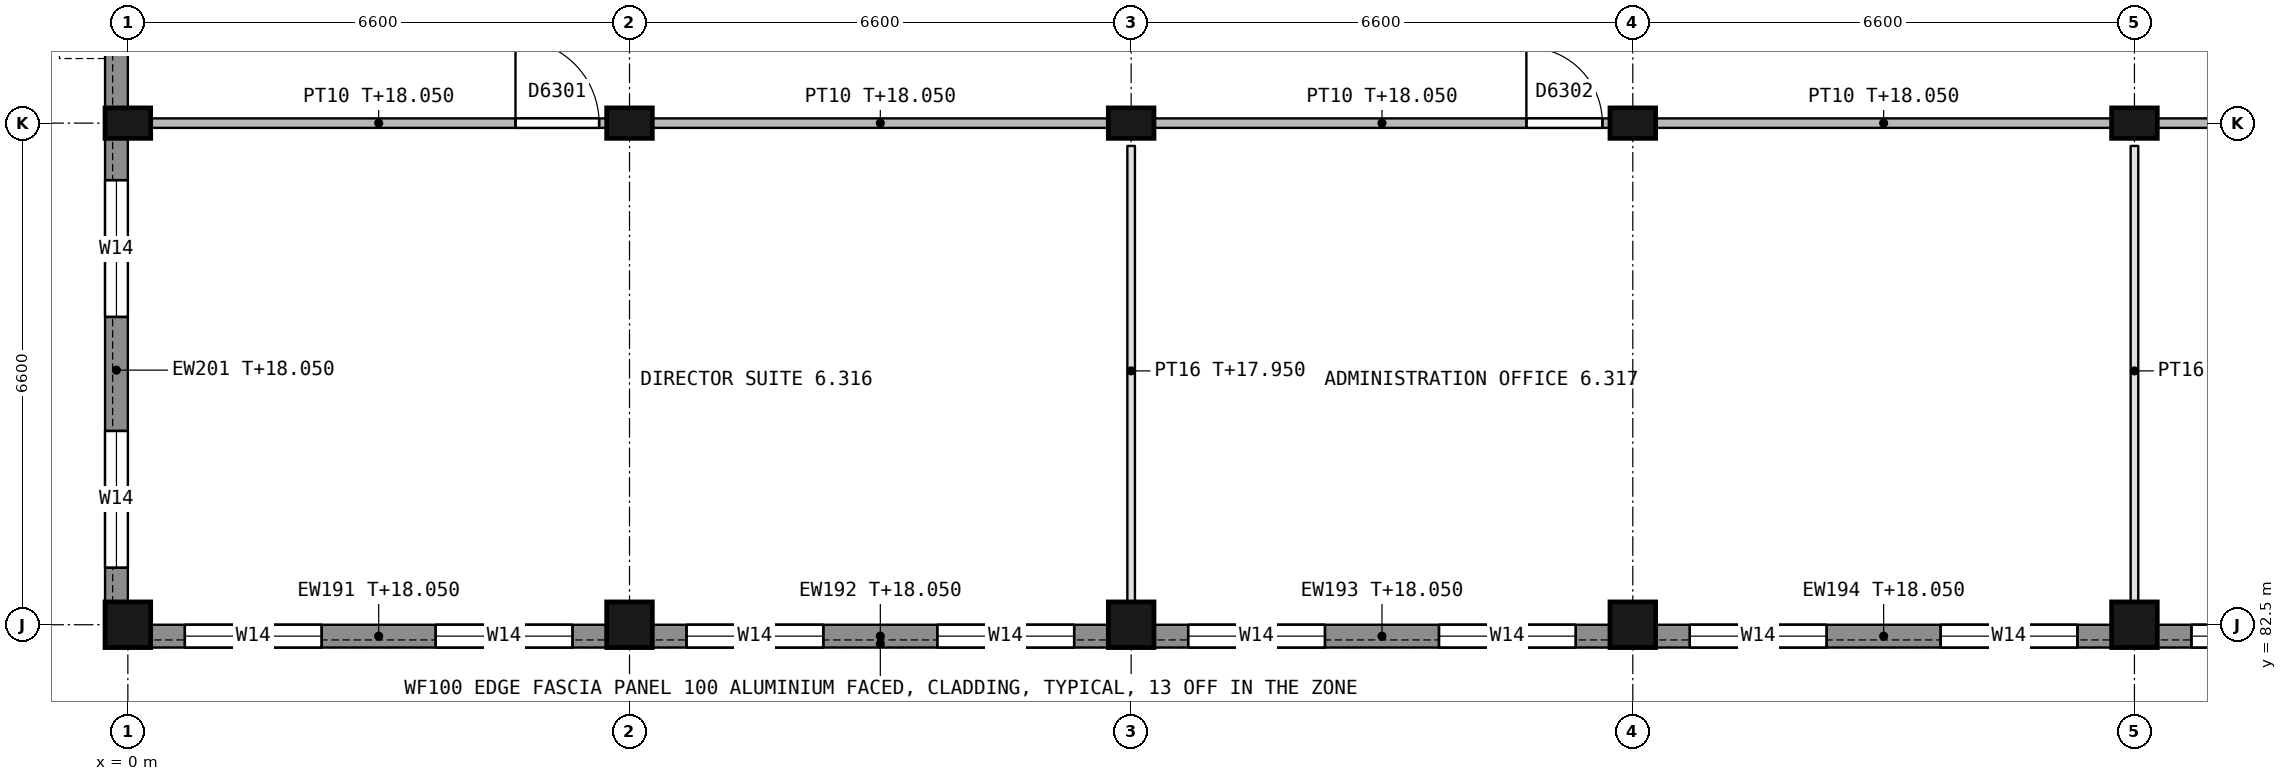
"""IFC4 building model, lengths in metres.
Left out: names, types, materials, properties, quantities, classifications, styles, units other than length and angle.
Written with IfcOpenShell. Run it as: python <this file> out.ifc"""

import sys

from ifc_helpers import new_model, si_unit, direction, frame, frame_2d, origin, origin_2d, place, context, subcontext, project, spatial, rectangle, extrude, element, fill, save


model = new_model("IFC4")
c1 = context("Model", 3, precision=1e-05, world=origin(), true_north=direction((0.0, 1.0)))
c2 = subcontext(c1, "Body", "Model", "MODEL_VIEW")
j1 = project(units=[si_unit("LENGTHUNIT", "METRE"), si_unit("PLANEANGLEUNIT", "RADIAN")], contexts=[c1])
p1 = place(None, origin())
s1 = spatial("IfcSite", under=j1, at=p1, CompositionType="ELEMENT")
p2 = place(p1, origin())
s2 = spatial("IfcBuilding", under=s1, at=p2, CompositionType="ELEMENT")
p3 = place(p2, frame((0.0, 0.0, 14.4)))
s3 = spatial("IfcBuildingStorey", under=s2, at=p3, CompositionType="ELEMENT", Elevation=14.4)
p4 = place(p3, frame((0.0, 82.5, 0.0), z_axis=(0.0, 0.0, 1.0), x_axis=(1.0, 0.0, 0.0)))
e1 = element("IfcColumn", 1, at=p4, inside=s3, PredefinedType="COLUMN", context=c2, shape_type="SweptSolid", body=[
    extrude(rectangle(XDim=0.6, YDim=0.6, at=origin_2d()), origin(), (0.0, 0.0, 1.0), 4.5),
])
p5 = place(p3, frame((0.0, 89.1, 0.0), z_axis=(0.0, 0.0, 1.0), x_axis=(1.0, 0.0, 0.0)))
e2 = element("IfcColumn", 2, at=p5, inside=s3, PredefinedType="COLUMN", context=c2, shape_type="SweptSolid", body=[
    extrude(rectangle(XDim=0.6, YDim=0.4, at=origin_2d()), origin(), (0.0, 0.0, 1.0), 4.5),
])
p6 = place(p3, frame((6.6, 82.5, 0.0), z_axis=(0.0, 0.0, 1.0), x_axis=(1.0, 0.0, 0.0)))
e3 = element("IfcColumn", 3, at=p6, inside=s3, PredefinedType="COLUMN", context=c2, shape_type="SweptSolid", body=[
    extrude(rectangle(XDim=0.6, YDim=0.6, at=origin_2d()), origin(), (0.0, 0.0, 1.0), 4.5),
])
p7 = place(p3, frame((6.6, 89.1, 0.0), z_axis=(0.0, 0.0, 1.0), x_axis=(1.0, 0.0, 0.0)))
e4 = element("IfcColumn", 4, at=p7, inside=s3, PredefinedType="COLUMN", context=c2, shape_type="SweptSolid", body=[
    extrude(rectangle(XDim=0.6, YDim=0.4, at=origin_2d()), origin(), (0.0, 0.0, 1.0), 4.5),
])
p8 = place(p3, frame((13.2, 82.5, 0.0), z_axis=(0.0, 0.0, 1.0), x_axis=(1.0, 0.0, 0.0)))
e5 = element("IfcColumn", 5, at=p8, inside=s3, PredefinedType="COLUMN", context=c2, shape_type="SweptSolid", body=[
    extrude(rectangle(XDim=0.6, YDim=0.6, at=origin_2d()), origin(), (0.0, 0.0, 1.0), 4.5),
])
p9 = place(p3, frame((13.2, 89.1, 0.0), z_axis=(0.0, 0.0, 1.0), x_axis=(1.0, 0.0, 0.0)))
e6 = element("IfcColumn", 6, at=p9, inside=s3, PredefinedType="COLUMN", context=c2, shape_type="SweptSolid", body=[
    extrude(rectangle(XDim=0.6, YDim=0.4, at=origin_2d()), origin(), (0.0, 0.0, 1.0), 4.5),
])
p10 = place(p3, frame((19.8, 82.5, 0.0), z_axis=(0.0, 0.0, 1.0), x_axis=(1.0, 0.0, 0.0)))
e7 = element("IfcColumn", 7, at=p10, inside=s3, PredefinedType="COLUMN", context=c2, shape_type="SweptSolid", body=[
    extrude(rectangle(XDim=0.6, YDim=0.6, at=origin_2d()), origin(), (0.0, 0.0, 1.0), 4.5),
])
p11 = place(p3, frame((19.8, 89.1, 0.0), z_axis=(0.0, 0.0, 1.0), x_axis=(1.0, 0.0, 0.0)))
e8 = element("IfcColumn", 8, at=p11, inside=s3, PredefinedType="COLUMN", context=c2, shape_type="SweptSolid", body=[
    extrude(rectangle(XDim=0.6, YDim=0.4, at=origin_2d()), origin(), (0.0, 0.0, 1.0), 4.5),
])
p12 = place(p3, frame((26.4, 82.5, 0.0), z_axis=(0.0, 0.0, 1.0), x_axis=(1.0, 0.0, 0.0)))
e9 = element("IfcColumn", 9, at=p12, inside=s3, PredefinedType="COLUMN", context=c2, shape_type="SweptSolid", body=[
    extrude(rectangle(XDim=0.6, YDim=0.6, at=origin_2d()), origin(), (0.0, 0.0, 1.0), 4.5),
])
p13 = place(p3, frame((26.4, 89.1, 0.0), z_axis=(0.0, 0.0, 1.0), x_axis=(1.0, 0.0, 0.0)))
e10 = element("IfcColumn", 10, at=p13, inside=s3, PredefinedType="COLUMN", context=c2, shape_type="SweptSolid", body=[
    extrude(rectangle(XDim=0.6, YDim=0.4, at=origin_2d()), origin(), (0.0, 0.0, 1.0), 4.5),
])
p14 = place(p3, frame((6.3, 82.35, 0.0), z_axis=(0.0, 0.0, 1.0), x_axis=(-1.0, 0.0, 0.0)))
e11 = element("IfcWall", 11, at=p14, inside=s3, PredefinedType="STANDARD", context=c2, shape_type="SweptSolid", body=[
    extrude(rectangle(XDim=6.0, YDim=0.3, at=frame_2d((3.0, 0.0))), origin(), (0.0, 0.0, 1.0), 3.65),
])
p15 = place(p14, frame((3.75, 0.0, 0.9)))
e12 = element("IfcOpeningElement", 12, at=p15, cuts=e11, PredefinedType="OPENING", context=c2, shape_type="SweptSolid", body=[
    extrude(rectangle(XDim=1.8, YDim=1.5, at=frame_2d((0.9, 0.75))), frame((0.0, 0.16, 0.0), z_axis=(0.0, -1.0, 0.0), x_axis=(1.0, 0.0, 0.0)), (0.0, 0.0, 1.0), 0.32),
])
p16 = place(p14, frame((0.45, 0.0, 0.9)))
e13 = element("IfcOpeningElement", 13, at=p16, cuts=e11, PredefinedType="OPENING", context=c2, shape_type="SweptSolid", body=[
    extrude(rectangle(XDim=1.8, YDim=1.5, at=frame_2d((0.9, 0.75))), frame((0.0, 0.16, 0.0), z_axis=(0.0, -1.0, 0.0), x_axis=(1.0, 0.0, 0.0)), (0.0, 0.0, 1.0), 0.32),
])
p17 = place(p3, frame((12.9, 82.35, 0.0), z_axis=(0.0, 0.0, 1.0), x_axis=(-1.0, 0.0, 0.0)))
e14 = element("IfcWall", 14, at=p17, inside=s3, PredefinedType="STANDARD", context=c2, shape_type="SweptSolid", body=[
    extrude(rectangle(XDim=6.0, YDim=0.3, at=frame_2d((3.0, 0.0))), origin(), (0.0, 0.0, 1.0), 3.65),
])
p18 = place(p17, frame((3.75, 0.0, 0.9)))
e15 = element("IfcOpeningElement", 15, at=p18, cuts=e14, PredefinedType="OPENING", context=c2, shape_type="SweptSolid", body=[
    extrude(rectangle(XDim=1.8, YDim=1.5, at=frame_2d((0.9, 0.75))), frame((0.0, 0.16, 0.0), z_axis=(0.0, -1.0, 0.0), x_axis=(1.0, 0.0, 0.0)), (0.0, 0.0, 1.0), 0.32),
])
p19 = place(p17, frame((0.45, 0.0, 0.9)))
e16 = element("IfcOpeningElement", 16, at=p19, cuts=e14, PredefinedType="OPENING", context=c2, shape_type="SweptSolid", body=[
    extrude(rectangle(XDim=1.8, YDim=1.5, at=frame_2d((0.9, 0.75))), frame((0.0, 0.16, 0.0), z_axis=(0.0, -1.0, 0.0), x_axis=(1.0, 0.0, 0.0)), (0.0, 0.0, 1.0), 0.32),
])
p20 = place(p3, frame((19.5, 82.35, 0.0), z_axis=(0.0, 0.0, 1.0), x_axis=(-1.0, 0.0, 0.0)))
e17 = element("IfcWall", 17, at=p20, inside=s3, PredefinedType="STANDARD", context=c2, shape_type="SweptSolid", body=[
    extrude(rectangle(XDim=6.0, YDim=0.3, at=frame_2d((3.0, 0.0))), origin(), (0.0, 0.0, 1.0), 3.65),
])
p21 = place(p20, frame((3.75, 0.0, 0.9)))
e18 = element("IfcOpeningElement", 18, at=p21, cuts=e17, PredefinedType="OPENING", context=c2, shape_type="SweptSolid", body=[
    extrude(rectangle(XDim=1.8, YDim=1.5, at=frame_2d((0.9, 0.75))), frame((0.0, 0.16, 0.0), z_axis=(0.0, -1.0, 0.0), x_axis=(1.0, 0.0, 0.0)), (0.0, 0.0, 1.0), 0.32),
])
p22 = place(p20, frame((0.45, 0.0, 0.9)))
e19 = element("IfcOpeningElement", 19, at=p22, cuts=e17, PredefinedType="OPENING", context=c2, shape_type="SweptSolid", body=[
    extrude(rectangle(XDim=1.8, YDim=1.5, at=frame_2d((0.9, 0.75))), frame((0.0, 0.16, 0.0), z_axis=(0.0, -1.0, 0.0), x_axis=(1.0, 0.0, 0.0)), (0.0, 0.0, 1.0), 0.32),
])
p23 = place(p3, frame((26.1, 82.35, 0.0), z_axis=(0.0, 0.0, 1.0), x_axis=(-1.0, 0.0, 0.0)))
e20 = element("IfcWall", 20, at=p23, inside=s3, PredefinedType="STANDARD", context=c2, shape_type="SweptSolid", body=[
    extrude(rectangle(XDim=6.0, YDim=0.3, at=frame_2d((3.0, 0.0))), origin(), (0.0, 0.0, 1.0), 3.65),
])
p24 = place(p23, frame((3.75, 0.0, 0.9)))
e21 = element("IfcOpeningElement", 21, at=p24, cuts=e20, PredefinedType="OPENING", context=c2, shape_type="SweptSolid", body=[
    extrude(rectangle(XDim=1.8, YDim=1.5, at=frame_2d((0.9, 0.75))), frame((0.0, 0.16, 0.0), z_axis=(0.0, -1.0, 0.0), x_axis=(1.0, 0.0, 0.0)), (0.0, 0.0, 1.0), 0.32),
])
p25 = place(p23, frame((0.45, 0.0, 0.9)))
e22 = element("IfcOpeningElement", 22, at=p25, cuts=e20, PredefinedType="OPENING", context=c2, shape_type="SweptSolid", body=[
    extrude(rectangle(XDim=1.8, YDim=1.5, at=frame_2d((0.9, 0.75))), frame((0.0, 0.16, 0.0), z_axis=(0.0, -1.0, 0.0), x_axis=(1.0, 0.0, 0.0)), (0.0, 0.0, 1.0), 0.32),
])
p26 = place(p3, frame((32.7, 82.35, 0.0), z_axis=(0.0, 0.0, 1.0), x_axis=(-1.0, 0.0, 0.0)))
e23 = element("IfcWall", 23, at=p26, inside=s3, PredefinedType="STANDARD", context=c2, shape_type="SweptSolid", body=[
    extrude(rectangle(XDim=6.0, YDim=0.3, at=frame_2d((3.0, 0.0))), origin(), (0.0, 0.0, 1.0), 3.65),
])
p27 = place(p26, frame((3.75, 0.0, 0.9)))
e24 = element("IfcOpeningElement", 24, at=p27, cuts=e23, PredefinedType="OPENING", context=c2, shape_type="SweptSolid", body=[
    extrude(rectangle(XDim=1.8, YDim=1.5, at=frame_2d((0.9, 0.75))), frame((0.0, 0.16, 0.0), z_axis=(0.0, -1.0, 0.0), x_axis=(1.0, 0.0, 0.0)), (0.0, 0.0, 1.0), 0.32),
])
p28 = place(p26, frame((0.45, 0.0, 0.9)))
e25 = element("IfcOpeningElement", 25, at=p28, cuts=e23, PredefinedType="OPENING", context=c2, shape_type="SweptSolid", body=[
    extrude(rectangle(XDim=1.8, YDim=1.5, at=frame_2d((0.9, 0.75))), frame((0.0, 0.16, 0.0), z_axis=(0.0, -1.0, 0.0), x_axis=(1.0, 0.0, 0.0)), (0.0, 0.0, 1.0), 0.32),
])
p29 = place(p3, frame((-0.15, 82.8, 0.0), z_axis=(0.0, 0.0, 1.0), x_axis=(0.0, 1.0, 0.0)))
e26 = element("IfcWall", 26, at=p29, inside=s3, PredefinedType="STANDARD", context=c2, shape_type="SweptSolid", body=[
    extrude(rectangle(XDim=6.1, YDim=0.3, at=frame_2d((3.05, 0.0))), origin(), (0.0, 0.0, 1.0), 3.65),
])
p30 = place(p29, frame((0.45, 0.0, 0.9)))
e27 = element("IfcOpeningElement", 27, at=p30, cuts=e26, PredefinedType="OPENING", context=c2, shape_type="SweptSolid", body=[
    extrude(rectangle(XDim=1.8, YDim=1.5, at=frame_2d((0.9, 0.75))), frame((0.0, 0.16, 0.0), z_axis=(0.0, -1.0, 0.0), x_axis=(1.0, 0.0, 0.0)), (0.0, 0.0, 1.0), 0.32),
])
p31 = place(p29, frame((3.75, 0.0, 0.9)))
e28 = element("IfcOpeningElement", 28, at=p31, cuts=e26, PredefinedType="OPENING", context=c2, shape_type="SweptSolid", body=[
    extrude(rectangle(XDim=1.8, YDim=1.5, at=frame_2d((0.9, 0.75))), frame((0.0, 0.16, 0.0), z_axis=(0.0, -1.0, 0.0), x_axis=(1.0, 0.0, 0.0)), (0.0, 0.0, 1.0), 0.32),
])
p32 = place(p3, frame((-0.15, 89.3, 0.0), z_axis=(0.0, 0.0, 1.0), x_axis=(0.0, 1.0, 0.0)))
e29 = element("IfcWall", 29, at=p32, inside=s3, PredefinedType="STANDARD", context=c2, shape_type="SweptSolid", body=[
    extrude(rectangle(XDim=3.1, YDim=0.3, at=frame_2d((1.55, 0.0))), origin(), (0.0, 0.0, 1.0), 3.65),
])
p33 = place(p32, frame((0.85, 0.0, 1.1)))
e30 = element("IfcOpeningElement", 30, at=p33, cuts=e29, PredefinedType="OPENING", context=c2, shape_type="SweptSolid", body=[
    extrude(rectangle(XDim=1.2, YDim=1.2, at=frame_2d((0.6, 0.6))), frame((0.0, 0.16, 0.0), z_axis=(0.0, -1.0, 0.0), x_axis=(1.0, 0.0, 0.0)), (0.0, 0.0, 1.0), 0.32),
])
p34 = place(p3, frame((6.3, 89.1, 0.0), z_axis=(0.0, 0.0, 1.0), x_axis=(-1.0, 0.0, 0.0)))
e31 = element("IfcWall", 31, at=p34, inside=s3, PredefinedType="PARTITIONING", context=c2, shape_type="SweptSolid", body=[
    extrude(rectangle(XDim=6.0, YDim=0.125, at=frame_2d((3.0, 0.0))), origin(), (0.0, 0.0, 1.0), 3.65),
])
p35 = place(p34, frame((0.1, 0.0, 0.0)))
e32 = element("IfcOpeningElement", 32, at=p35, cuts=e31, PredefinedType="OPENING", context=c2, shape_type="SweptSolid", body=[
    extrude(rectangle(XDim=1.1, YDim=2.1, at=frame_2d((0.55, 1.05))), frame((0.0, 0.073, 0.0), z_axis=(0.0, -1.0, 0.0), x_axis=(1.0, 0.0, 0.0)), (0.0, 0.0, 1.0), 0.145),
])
p36 = place(p3, frame((6.9, 89.1, 0.0), z_axis=(0.0, 0.0, 1.0), x_axis=(1.0, 0.0, 0.0)))
e33 = element("IfcWall", 33, at=p36, inside=s3, PredefinedType="PARTITIONING", context=c2, shape_type="SweptSolid", body=[
    extrude(rectangle(XDim=6.0, YDim=0.125, at=frame_2d((3.0, 0.0))), origin(), (0.0, 0.0, 1.0), 3.65),
])
p37 = place(p3, frame((19.5, 89.1, 0.0), z_axis=(0.0, 0.0, 1.0), x_axis=(-1.0, 0.0, 0.0)))
e34 = element("IfcWall", 34, at=p37, inside=s3, PredefinedType="PARTITIONING", context=c2, shape_type="SweptSolid", body=[
    extrude(rectangle(XDim=6.0, YDim=0.125, at=frame_2d((3.0, 0.0))), origin(), (0.0, 0.0, 1.0), 3.65),
])
p38 = place(p37, frame((0.1, 0.0, 0.0)))
e35 = element("IfcOpeningElement", 35, at=p38, cuts=e34, PredefinedType="OPENING", context=c2, shape_type="SweptSolid", body=[
    extrude(rectangle(XDim=1.0, YDim=2.1, at=frame_2d((0.5, 1.05))), frame((0.0, 0.073, 0.0), z_axis=(0.0, -1.0, 0.0), x_axis=(1.0, 0.0, 0.0)), (0.0, 0.0, 1.0), 0.145),
])
p39 = place(p3, frame((20.1, 89.1, 0.0), z_axis=(0.0, 0.0, 1.0), x_axis=(1.0, 0.0, 0.0)))
e36 = element("IfcWall", 36, at=p39, inside=s3, PredefinedType="PARTITIONING", context=c2, shape_type="SweptSolid", body=[
    extrude(rectangle(XDim=6.0, YDim=0.125, at=frame_2d((3.0, 0.0))), origin(), (0.0, 0.0, 1.0), 3.65),
])
p40 = place(p3, frame((26.7, 89.1, 0.0), z_axis=(0.0, 0.0, 1.0), x_axis=(1.0, 0.0, 0.0)))
e37 = element("IfcWall", 37, at=p40, inside=s3, PredefinedType="PARTITIONING", context=c2, shape_type="SweptSolid", body=[
    extrude(rectangle(XDim=6.0, YDim=0.125, at=frame_2d((3.0, 0.0))), origin(), (0.0, 0.0, 1.0), 3.65),
])
p41 = place(p40, frame((4.1, 0.0, 0.0)))
e38 = element("IfcOpeningElement", 38, at=p41, cuts=e37, PredefinedType="OPENING", context=c2, shape_type="SweptSolid", body=[
    extrude(rectangle(XDim=1.8, YDim=2.1, at=frame_2d((0.9, 1.05))), frame((0.0, 0.073, 0.0), z_axis=(0.0, -1.0, 0.0), x_axis=(1.0, 0.0, 0.0)), (0.0, 0.0, 1.0), 0.145),
])
for number, where, z_axis, x_axis in (
    (39, (13.2, 82.8, 0.0), (0.0, 0.0, 1.0), (0.0, 1.0, 0.0)),
    (40, (26.4, 82.8, 0.0), (0.0, 0.0, 1.0), (0.0, 1.0, 0.0)),
):
    element("IfcWall", number, at=place(p3, frame(where, z_axis=z_axis, x_axis=x_axis)), inside=s3, PredefinedType="PARTITIONING", context=c2, shape_type="SweptSolid", body=[
        extrude(rectangle(XDim=6.0, YDim=0.1, at=frame_2d((3.0, 0.0))), origin(), (0.0, 0.0, 1.0), 3.55),
    ])
p42 = place(p15, origin())
e41 = element("IfcWindow", 41, at=p42, inside=s3, PartitioningType="SINGLE_PANEL", PredefinedType="WINDOW", context=c2, shape_type="SweptSolid", body=[
    extrude(rectangle(XDim=1.8, YDim=1.5, at=frame_2d((0.9, 0.75))), frame((0.0, 0.03, 0.0), z_axis=(0.0, -1.0, 0.0), x_axis=(1.0, 0.0, 0.0)), (0.0, 0.0, 1.0), 0.06),
])
fill(e12, e41)
p43 = place(p16, origin())
e42 = element("IfcWindow", 42, at=p43, inside=s3, PartitioningType="SINGLE_PANEL", PredefinedType="WINDOW", context=c2, shape_type="SweptSolid", body=[
    extrude(rectangle(XDim=1.8, YDim=1.5, at=frame_2d((0.9, 0.75))), frame((0.0, 0.03, 0.0), z_axis=(0.0, -1.0, 0.0), x_axis=(1.0, 0.0, 0.0)), (0.0, 0.0, 1.0), 0.06),
])
fill(e13, e42)
p44 = place(p18, origin())
e43 = element("IfcWindow", 43, at=p44, inside=s3, PartitioningType="SINGLE_PANEL", PredefinedType="WINDOW", context=c2, shape_type="SweptSolid", body=[
    extrude(rectangle(XDim=1.8, YDim=1.5, at=frame_2d((0.9, 0.75))), frame((0.0, 0.03, 0.0), z_axis=(0.0, -1.0, 0.0), x_axis=(1.0, 0.0, 0.0)), (0.0, 0.0, 1.0), 0.06),
])
fill(e15, e43)
p45 = place(p19, origin())
e44 = element("IfcWindow", 44, at=p45, inside=s3, PartitioningType="SINGLE_PANEL", PredefinedType="WINDOW", context=c2, shape_type="SweptSolid", body=[
    extrude(rectangle(XDim=1.8, YDim=1.5, at=frame_2d((0.9, 0.75))), frame((0.0, 0.03, 0.0), z_axis=(0.0, -1.0, 0.0), x_axis=(1.0, 0.0, 0.0)), (0.0, 0.0, 1.0), 0.06),
])
fill(e16, e44)
p46 = place(p21, origin())
e45 = element("IfcWindow", 45, at=p46, inside=s3, PartitioningType="SINGLE_PANEL", PredefinedType="WINDOW", context=c2, shape_type="SweptSolid", body=[
    extrude(rectangle(XDim=1.8, YDim=1.5, at=frame_2d((0.9, 0.75))), frame((0.0, 0.03, 0.0), z_axis=(0.0, -1.0, 0.0), x_axis=(1.0, 0.0, 0.0)), (0.0, 0.0, 1.0), 0.06),
])
fill(e18, e45)
p47 = place(p22, origin())
e46 = element("IfcWindow", 46, at=p47, inside=s3, PartitioningType="SINGLE_PANEL", PredefinedType="WINDOW", context=c2, shape_type="SweptSolid", body=[
    extrude(rectangle(XDim=1.8, YDim=1.5, at=frame_2d((0.9, 0.75))), frame((0.0, 0.03, 0.0), z_axis=(0.0, -1.0, 0.0), x_axis=(1.0, 0.0, 0.0)), (0.0, 0.0, 1.0), 0.06),
])
fill(e19, e46)
p48 = place(p24, origin())
e47 = element("IfcWindow", 47, at=p48, inside=s3, PartitioningType="SINGLE_PANEL", PredefinedType="WINDOW", context=c2, shape_type="SweptSolid", body=[
    extrude(rectangle(XDim=1.8, YDim=1.5, at=frame_2d((0.9, 0.75))), frame((0.0, 0.03, 0.0), z_axis=(0.0, -1.0, 0.0), x_axis=(1.0, 0.0, 0.0)), (0.0, 0.0, 1.0), 0.06),
])
fill(e21, e47)
p49 = place(p25, origin())
e48 = element("IfcWindow", 48, at=p49, inside=s3, PartitioningType="SINGLE_PANEL", PredefinedType="WINDOW", context=c2, shape_type="SweptSolid", body=[
    extrude(rectangle(XDim=1.8, YDim=1.5, at=frame_2d((0.9, 0.75))), frame((0.0, 0.03, 0.0), z_axis=(0.0, -1.0, 0.0), x_axis=(1.0, 0.0, 0.0)), (0.0, 0.0, 1.0), 0.06),
])
fill(e22, e48)
p50 = place(p27, origin())
e49 = element("IfcWindow", 49, at=p50, inside=s3, PartitioningType="SINGLE_PANEL", PredefinedType="WINDOW", context=c2, shape_type="SweptSolid", body=[
    extrude(rectangle(XDim=1.8, YDim=1.5, at=frame_2d((0.9, 0.75))), frame((0.0, 0.03, 0.0), z_axis=(0.0, -1.0, 0.0), x_axis=(1.0, 0.0, 0.0)), (0.0, 0.0, 1.0), 0.06),
])
fill(e24, e49)
p51 = place(p30, origin())
e50 = element("IfcWindow", 50, at=p51, inside=s3, PartitioningType="SINGLE_PANEL", PredefinedType="WINDOW", context=c2, shape_type="SweptSolid", body=[
    extrude(rectangle(XDim=1.8, YDim=1.5, at=frame_2d((0.9, 0.75))), frame((0.0, 0.03, 0.0), z_axis=(0.0, -1.0, 0.0), x_axis=(1.0, 0.0, 0.0)), (0.0, 0.0, 1.0), 0.06),
])
fill(e27, e50)
p52 = place(p31, origin())
e51 = element("IfcWindow", 51, at=p52, inside=s3, PartitioningType="SINGLE_PANEL", PredefinedType="WINDOW", context=c2, shape_type="SweptSolid", body=[
    extrude(rectangle(XDim=1.8, YDim=1.5, at=frame_2d((0.9, 0.75))), frame((0.0, 0.03, 0.0), z_axis=(0.0, -1.0, 0.0), x_axis=(1.0, 0.0, 0.0)), (0.0, 0.0, 1.0), 0.06),
])
fill(e28, e51)
p53 = place(p35, origin())
e52 = element("IfcDoor", 52, at=p53, inside=s3, OperationType="SINGLE_SWING_RIGHT", PredefinedType="DOOR", context=c2, shape_type="SweptSolid", body=[
    extrude(rectangle(XDim=1.1, YDim=2.1, at=frame_2d((0.55, 1.05))), frame((0.0, 0.025, 0.0), z_axis=(0.0, -1.0, 0.0), x_axis=(1.0, 0.0, 0.0)), (0.0, 0.0, 1.0), 0.05),
])
fill(e32, e52)
p54 = place(p38, origin())
e53 = element("IfcDoor", 53, at=p54, inside=s3, OperationType="SINGLE_SWING_RIGHT", PredefinedType="DOOR", context=c2, shape_type="SweptSolid", body=[
    extrude(rectangle(XDim=1.0, YDim=2.1, at=frame_2d((0.5, 1.05))), frame((0.0, 0.025, 0.0), z_axis=(0.0, -1.0, 0.0), x_axis=(1.0, 0.0, 0.0)), (0.0, 0.0, 1.0), 0.05),
])
fill(e35, e53)
save(model, sys.argv[1])
